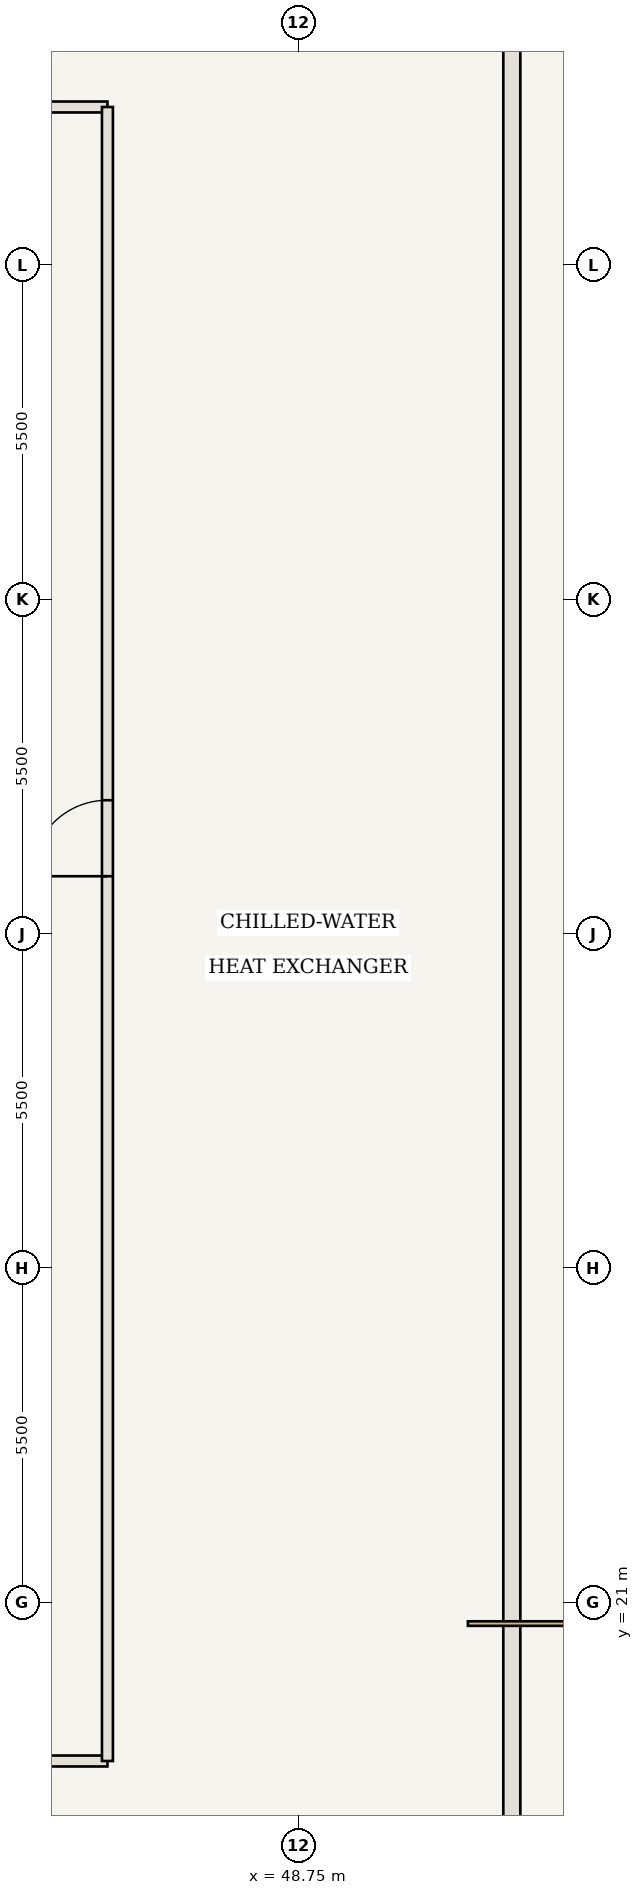
"""IFC4 building model, lengths in metres.
Left out: names, types, materials, properties, quantities, classifications, styles, units other than length and angle.
Written with IfcOpenShell. Run it as: python <this file> out.ifc"""

import sys

from ifc_helpers import new_model, si_unit, direction, frame, frame_2d, origin, place, context, subcontext, project, spatial, rectangle, extrude, element, fill, save


model = new_model("IFC4")
c1 = context("Model", 3, precision=1e-05, world=origin(), true_north=direction((0.0, 1.0)))
c2 = subcontext(c1, "Body", "Model", "MODEL_VIEW")
j1 = project(units=[si_unit("LENGTHUNIT", "METRE"), si_unit("PLANEANGLEUNIT", "RADIAN")], contexts=[c1])
p1 = place(None, origin())
s1 = spatial("IfcSite", under=j1, at=p1, CompositionType="ELEMENT")
p2 = place(p1, origin())
s2 = spatial("IfcBuilding", under=s1, at=p2, CompositionType="ELEMENT")
p3 = place(p2, frame((0.0, 0.0, 252.35)))
s3 = spatial("IfcBuildingStorey", under=s2, at=p3, CompositionType="ELEMENT", Elevation=252.35)
p4 = place(p3, frame((18.4, 18.4, 0.0), z_axis=(0.0, 0.0, 1.0), x_axis=(1.0, 0.0, 0.0)))
e1 = element("IfcWall", 1, at=p4, inside=s3, PredefinedType="STANDARD", context=c2, shape_type="SweptSolid", body=[
    extrude(rectangle(XDim=27.2, YDim=0.18, at=frame_2d((13.6, 0.0))), origin(), (0.0, 0.0, 1.0), 4.83),
])
p5 = place(p4, frame((4.4, 0.0, 0.0)))
e2 = element("IfcOpeningElement", 2, at=p5, cuts=e1, PredefinedType="OPENING", context=c2, shape_type="SweptSolid", body=[
    extrude(rectangle(XDim=1.25, YDim=2.2, at=frame_2d((0.625, 1.1))), frame((0.0, 0.1, 0.0), z_axis=(0.0, -1.0, 0.0), x_axis=(1.0, 0.0, 0.0)), (0.0, 0.0, 1.0), 0.2),
])
p6 = place(p3, frame((18.4, 45.6, 0.0), z_axis=(0.0, 0.0, 1.0), x_axis=(1.0, 0.0, 0.0)))
e3 = element("IfcWall", 3, at=p6, inside=s3, PredefinedType="STANDARD", context=c2, shape_type="SweptSolid", body=[
    extrude(rectangle(XDim=27.2, YDim=0.18, at=frame_2d((13.6, 0.0))), origin(), (0.0, 0.0, 1.0), 4.83),
])
p7 = place(p6, frame((4.4, 0.0, 0.0)))
e4 = element("IfcOpeningElement", 4, at=p7, cuts=e3, PredefinedType="OPENING", context=c2, shape_type="SweptSolid", body=[
    extrude(rectangle(XDim=1.25, YDim=2.2, at=frame_2d((0.625, 1.1))), frame((0.0, 0.1, 0.0), z_axis=(0.0, -1.0, 0.0), x_axis=(1.0, 0.0, 0.0)), (0.0, 0.0, 1.0), 0.2),
])
p8 = place(p3, frame((45.6, 18.4, 0.0), z_axis=(0.0, 0.0, 1.0), x_axis=(0.0, 1.0, 0.0)))
e5 = element("IfcWall", 5, at=p8, inside=s3, PredefinedType="STANDARD", context=c2, shape_type="SweptSolid", body=[
    extrude(rectangle(XDim=27.2, YDim=0.18, at=frame_2d((13.6, 0.0))), origin(), (0.0, 0.0, 1.0), 4.83),
])
p9 = place(p8, frame((14.55, 0.0, 0.0)))
e6 = element("IfcOpeningElement", 6, at=p9, cuts=e5, PredefinedType="OPENING", context=c2, shape_type="SweptSolid", body=[
    extrude(rectangle(XDim=1.25, YDim=2.2, at=frame_2d((0.625, 1.1))), frame((0.0, 0.1, 0.0), z_axis=(0.0, -1.0, 0.0), x_axis=(1.0, 0.0, 0.0)), (0.0, 0.0, 1.0), 0.2),
])
p10 = place(p3, frame((52.25, 52.25, 0.0), z_axis=(0.0, 0.0, 1.0), x_axis=(0.0, -1.0, 0.0)))
e7 = element("IfcWall", 7, at=p10, inside=s3, PredefinedType="USERDEFINED", context=c2, shape_type="SweptSolid", body=[
    extrude(rectangle(XDim=40.5, YDim=0.28, at=frame_2d((20.25, 0.0))), origin(), (0.0, 0.0, 1.0), 2.83),
])
p11 = place(p9, origin())
e8 = element("IfcDoor", 8, at=p11, inside=s3, OperationType="SINGLE_SWING_LEFT", PredefinedType="DOOR", context=c2, shape_type="SweptSolid", body=[
    extrude(rectangle(XDim=1.25, YDim=2.2, at=frame_2d((0.625, 1.1))), frame((0.0, 0.025, 0.0), z_axis=(0.0, -1.0, 0.0), x_axis=(1.0, 0.0, 0.0)), (0.0, 0.0, 1.0), 0.05),
])
fill(e6, e8)
save(model, sys.argv[1])
